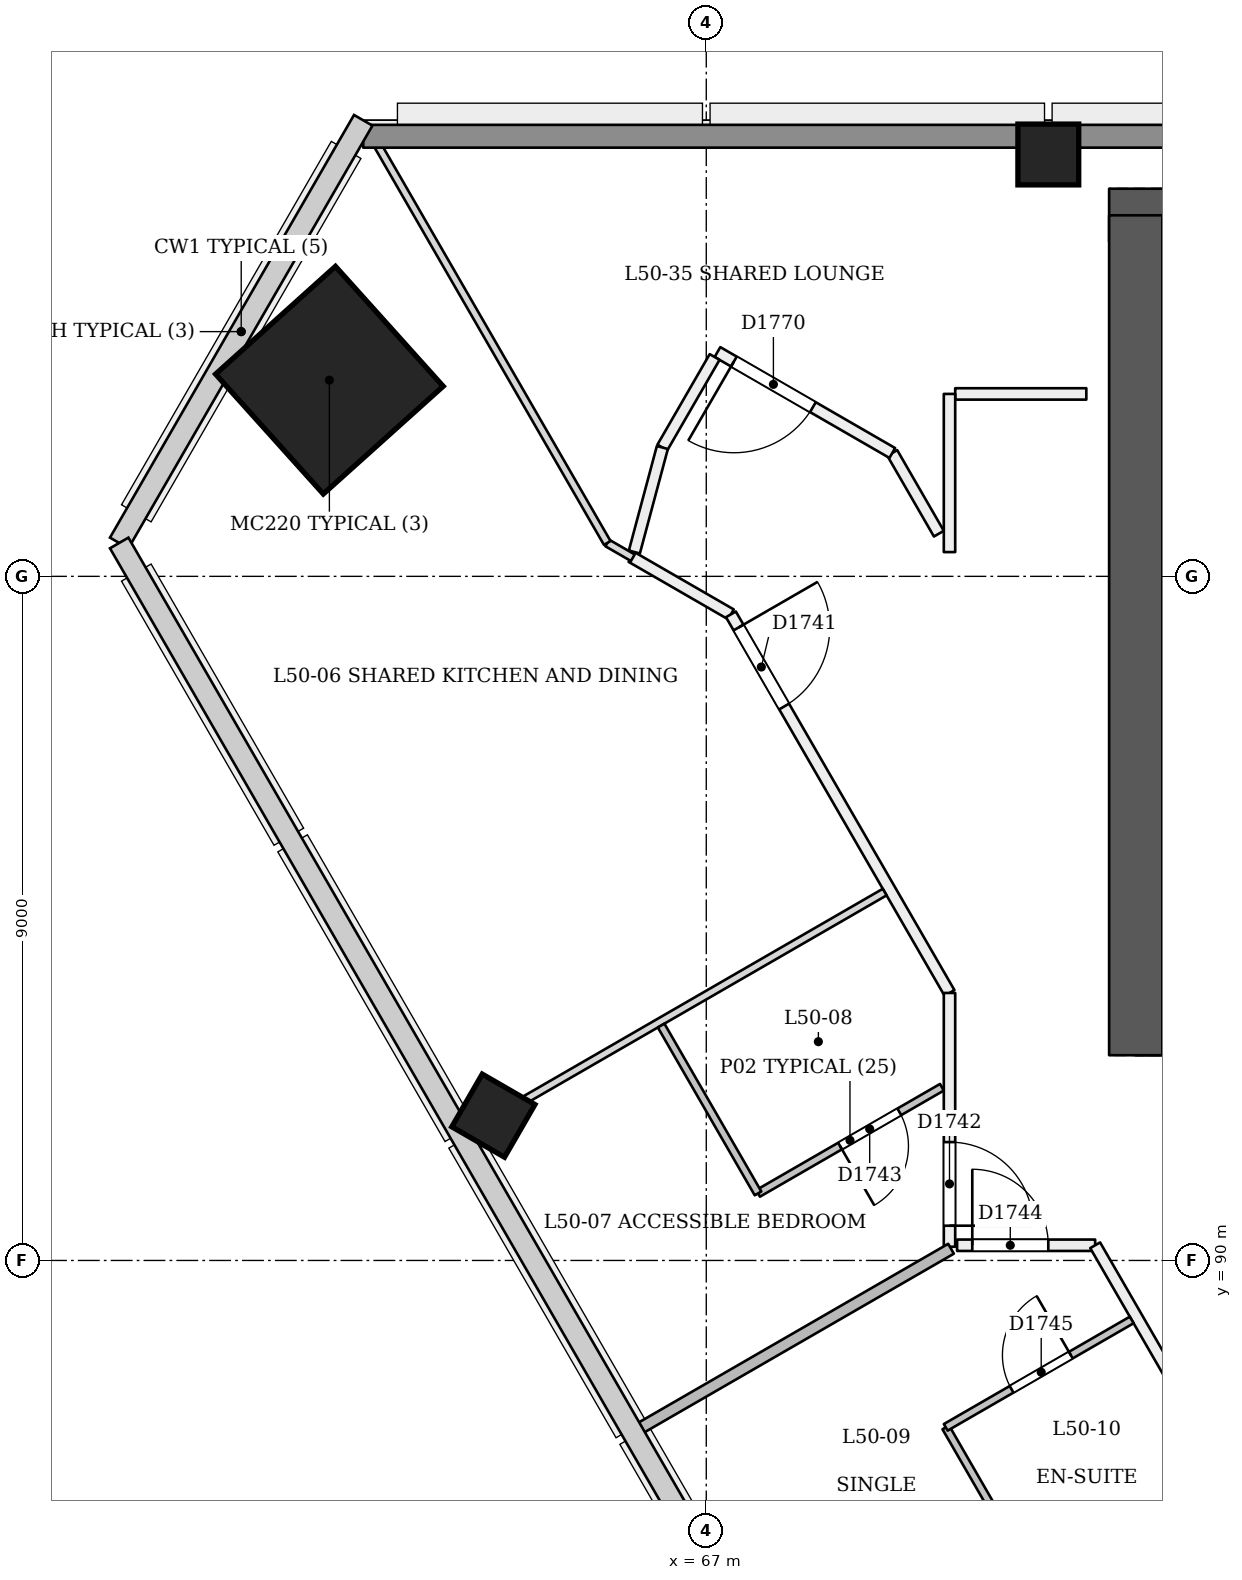
"""IFC4 building model, lengths in metres.
Left out: names, types, materials, properties, quantities, classifications, styles, units other than length and angle.
Written with IfcOpenShell. Run it as: python <this file> out.ifc"""

import sys

from ifc_helpers import new_model, si_unit, direction, frame, frame_2d, origin, origin_2d, place, context, subcontext, project, spatial, rectangle, extrude, element, fill, save


model = new_model("IFC4")
c1 = context("Model", 3, precision=1e-05, world=origin(), true_north=direction((0.0, 1.0)))
c2 = subcontext(c1, "Body", "Model", "MODEL_VIEW")
j1 = project(units=[si_unit("LENGTHUNIT", "METRE"), si_unit("PLANEANGLEUNIT", "RADIAN")], contexts=[c1])
p1 = place(None, origin())
s1 = spatial("IfcSite", under=j1, at=p1, CompositionType="ELEMENT")
p2 = place(p1, origin())
s2 = spatial("IfcBuilding", under=s1, at=p2, CompositionType="ELEMENT")
p3 = place(p2, frame((0.0, 0.0, 194.4)))
s3 = spatial("IfcBuildingStorey", under=s2, at=p3, CompositionType="ELEMENT", Elevation=194.4)
p4 = place(p3, frame((72.65, 93.05, 0.0), z_axis=(0.0, 0.0, 1.0), x_axis=(1.0, 0.0, 0.0)))
e1 = element("IfcWall", 1, at=p4, inside=s3, PredefinedType="SHEAR", context=c2, shape_type="SweptSolid", body=[
    extrude(rectangle(XDim=25.05, YDim=0.7, at=frame_2d((12.525, 0.0))), origin(), (0.0, 0.0, 1.0), 3.6),
])
p5 = place(p4, frame((1.15, 0.0, 0.0)))
e2 = element("IfcOpeningElement", 2, at=p5, cuts=e1, PredefinedType="OPENING", context=c2, shape_type="SweptSolid", body=[
    extrude(rectangle(XDim=1.2, YDim=2.1, at=frame_2d((0.6, 1.05))), frame((0.0, 0.36, 0.0), z_axis=(0.0, -1.0, 0.0), x_axis=(1.0, 0.0, 0.0)), (0.0, 0.0, 1.0), 0.721),
])
p6 = place(p4, frame((3.35, 0.0, 0.0)))
e3 = element("IfcOpeningElement", 3, at=p6, cuts=e1, PredefinedType="OPENING", context=c2, shape_type="SweptSolid", body=[
    extrude(rectangle(XDim=1.2, YDim=2.1, at=frame_2d((0.6, 1.05))), frame((0.0, 0.36, 0.0), z_axis=(0.0, -1.0, 0.0), x_axis=(1.0, 0.0, 0.0)), (0.0, 0.0, 1.0), 0.721),
])
p7 = place(p4, frame((13.35, 0.0, 0.0)))
e4 = element("IfcOpeningElement", 4, at=p7, cuts=e1, PredefinedType="OPENING", context=c2, shape_type="SweptSolid", body=[
    extrude(rectangle(XDim=1.2, YDim=2.1, at=frame_2d((0.6, 1.05))), frame((0.0, 0.36, 0.0), z_axis=(0.0, -1.0, 0.0), x_axis=(1.0, 0.0, 0.0)), (0.0, 0.0, 1.0), 0.721),
])
p8 = place(p4, frame((16.212, 0.0, 0.0)))
e5 = element("IfcOpeningElement", 5, at=p8, cuts=e1, PredefinedType="OPENING", context=c2, shape_type="SweptSolid", body=[
    extrude(rectangle(XDim=1.0, YDim=2.1, at=frame_2d((0.5, 1.05))), frame((0.0, 0.36, 0.0), z_axis=(0.0, -1.0, 0.0), x_axis=(1.0, 0.0, 0.0)), (0.0, 0.0, 1.0), 0.721),
])
p9 = place(p4, frame((19.65, 0.0, 0.0)))
e6 = element("IfcOpeningElement", 6, at=p9, cuts=e1, PredefinedType="OPENING", context=c2, shape_type="SweptSolid", body=[
    extrude(rectangle(XDim=1.0, YDim=2.1, at=frame_2d((0.5, 1.05))), frame((0.0, 0.36, 0.0), z_axis=(0.0, -1.0, 0.0), x_axis=(1.0, 0.0, 0.0)), (0.0, 0.0, 1.0), 0.721),
])
p10 = place(p4, frame((22.637, 0.0, 0.0)))
e7 = element("IfcOpeningElement", 7, at=p10, cuts=e1, PredefinedType="OPENING", context=c2, shape_type="SweptSolid", body=[
    extrude(rectangle(XDim=1.0, YDim=2.1, at=frame_2d((0.5, 1.05))), frame((0.0, 0.36, 0.0), z_axis=(0.0, -1.0, 0.0), x_axis=(1.0, 0.0, 0.0)), (0.0, 0.0, 1.0), 0.721),
])
p11 = place(p3, frame((97.35, 103.75, 0.0), z_axis=(0.0, 0.0, 1.0), x_axis=(-1.0, 0.0, 0.0)))
e8 = element("IfcWall", 8, at=p11, inside=s3, PredefinedType="SHEAR", context=c2, shape_type="SweptSolid", body=[
    extrude(rectangle(XDim=25.05, YDim=0.7, at=frame_2d((12.525, 0.0))), origin(), (0.0, 0.0, 1.0), 3.6),
])
p12 = place(p3, frame((72.65, 103.75, 0.0), z_axis=(0.0, 0.0, 1.0), x_axis=(0.0, -1.0, 0.0)))
e9 = element("IfcWall", 9, at=p12, inside=s3, PredefinedType="SHEAR", context=c2, shape_type="SweptSolid", body=[
    extrude(rectangle(XDim=11.05, YDim=0.7, at=frame_2d((5.525, 0.0))), origin(), (0.0, 0.0, 1.0), 3.6),
])
p13 = place(p3, frame((62.008, 101.57, 0.0), z_axis=(0.028334066552, 0.009286524205, 0.999555371723), x_axis=(-0.866557155579, 0.49867971023, 0.019930948781)))
e10 = element("IfcColumn", 10, at=p13, inside=s3, PredefinedType="COLUMN", context=c2, shape_type="SweptSolid", body=[
    extrude(rectangle(XDim=2.12, YDim=2.12, at=origin_2d()), origin(), (0.0, 0.0, 1.0), 3.602),
])
p14 = place(p3, frame((71.5, 104.55, 0.0), z_axis=(0.0, 0.0, 1.0), x_axis=(1.0, 0.0, 0.0)))
e11 = element("IfcColumn", 11, at=p14, inside=s3, PredefinedType="COLUMN", context=c2, shape_type="SweptSolid", body=[
    extrude(rectangle(XDim=0.8, YDim=0.8, at=origin_2d()), origin(), (0.0, 0.0, 1.0), 3.6),
])
p15 = place(p3, frame((64.173, 91.859, 0.0), z_axis=(0.022235136645, 0.038468150514, 0.999012412383), x_axis=(-0.865845034967, -0.498830353482, 0.038479265431)))
e12 = element("IfcColumn", 12, at=p15, inside=s3, PredefinedType="COLUMN", context=c2, shape_type="SweptSolid", body=[
    extrude(rectangle(XDim=0.8, YDim=0.8, at=origin_2d()), origin(), (0.0, 0.0, 1.0), 3.579),
])
p16 = place(p3, frame((66.016, 99.255, 0.0), z_axis=(0.0, 0.0, 1.0), x_axis=(0.866026809777, -0.499997564742, 0.0)))
e13 = element("IfcWall", 13, at=p16, inside=s3, PredefinedType="PARTITIONING", context=c2, shape_type="SweptSolid", body=[
    extrude(rectangle(XDim=1.511, YDim=0.15, at=frame_2d((0.755, 0.0))), origin(), (0.0, 0.0, 1.0), 3.15),
])
p17 = place(p3, frame((67.324, 98.5, 0.0), z_axis=(0.0, 0.0, 1.0), x_axis=(0.499996810272, -0.866027245367, 0.0)))
e14 = element("IfcWall", 14, at=p17, inside=s3, PredefinedType="PARTITIONING", context=c2, shape_type="SweptSolid", body=[
    extrude(rectangle(XDim=5.751, YDim=0.15, at=frame_2d((2.876, 0.0))), origin(), (0.0, 0.0, 1.0), 3.15),
])
p18 = place(p17, frame((0.2, 0.0, 0.0)))
e15 = element("IfcOpeningElement", 15, at=p18, cuts=e14, PredefinedType="OPENING", context=c2, shape_type="SweptSolid", body=[
    extrude(rectangle(XDim=1.2, YDim=2.1, at=frame_2d((0.6, 1.05))), frame((0.0, 0.085, 0.0), z_axis=(0.0, -1.0, 0.0), x_axis=(1.0, 0.0, 0.0)), (0.0, 0.0, 1.0), 0.171),
])
p19 = place(p3, frame((70.2, 93.519, 0.0), z_axis=(0.0, 0.0, 1.0), x_axis=(0.0, -1.0, 0.0)))
e16 = element("IfcWall", 16, at=p19, inside=s3, PredefinedType="PARTITIONING", context=c2, shape_type="SweptSolid", body=[
    extrude(rectangle(XDim=3.339, YDim=0.15, at=frame_2d((1.669, 0.0))), origin(), (0.0, 0.0, 1.0), 3.15),
])
p20 = place(p19, frame((1.962, 0.0, 0.0)))
e17 = element("IfcOpeningElement", 17, at=p20, cuts=e16, PredefinedType="OPENING", context=c2, shape_type="SweptSolid", body=[
    extrude(rectangle(XDim=1.1, YDim=2.1, at=frame_2d((0.55, 1.05))), frame((0.0, 0.085, 0.0), z_axis=(0.0, -1.0, 0.0), x_axis=(1.0, 0.0, 0.0)), (0.0, 0.0, 1.0), 0.171),
])
p21 = place(p3, frame((70.3, 90.2, 0.0), z_axis=(0.0, 0.0, 1.0), x_axis=(1.0, 0.0, 0.0)))
e18 = element("IfcWall", 18, at=p21, inside=s3, PredefinedType="PARTITIONING", context=c2, shape_type="SweptSolid", body=[
    extrude(rectangle(XDim=1.817, YDim=0.15, at=frame_2d((0.908, 0.0))), origin(), (0.0, 0.0, 1.0), 3.15),
])
p22 = place(p21, frame((0.2, 0.0, 0.0)))
e19 = element("IfcOpeningElement", 19, at=p22, cuts=e18, PredefinedType="OPENING", context=c2, shape_type="SweptSolid", body=[
    extrude(rectangle(XDim=1.0, YDim=2.1, at=frame_2d((0.5, 1.05))), frame((0.0, 0.085, 0.0), z_axis=(0.0, -1.0, 0.0), x_axis=(1.0, 0.0, 0.0)), (0.0, 0.0, 1.0), 0.171),
])
p23 = place(p3, frame((72.116, 90.2, 0.0), z_axis=(0.0, 0.0, 1.0), x_axis=(0.500004369671, -0.866022880939, 0.0)))
e20 = element("IfcWall", 20, at=p23, inside=s3, PredefinedType="PARTITIONING", context=c2, shape_type="SweptSolid", body=[
    extrude(rectangle(XDim=25.637, YDim=0.15, at=frame_2d((12.819, 0.0))), origin(), (0.0, 0.0, 1.0), 2.75),
])
p24 = place(p23, frame((6.487, 0.0, 0.0)))
e21 = element("IfcOpeningElement", 21, at=p24, cuts=e20, PredefinedType="OPENING", context=c2, shape_type="SweptSolid", body=[
    extrude(rectangle(XDim=1.0, YDim=2.1, at=frame_2d((0.5, 1.05))), frame((0.0, 0.085, 0.0), z_axis=(0.0, -1.0, 0.0), x_axis=(1.0, 0.0, 0.0)), (0.0, 0.0, 1.0), 0.171),
])
p25 = place(p23, frame((10.992, 0.0, 0.0)))
e22 = element("IfcOpeningElement", 22, at=p25, cuts=e20, PredefinedType="OPENING", context=c2, shape_type="SweptSolid", body=[
    extrude(rectangle(XDim=1.2, YDim=2.1, at=frame_2d((0.6, 1.05))), frame((0.0, 0.085, 0.0), z_axis=(0.0, -1.0, 0.0), x_axis=(1.0, 0.0, 0.0)), (0.0, 0.0, 1.0), 0.171),
])
p26 = place(p23, frame((19.987, 0.0, 0.0)))
e23 = element("IfcOpeningElement", 23, at=p26, cuts=e20, PredefinedType="OPENING", context=c2, shape_type="SweptSolid", body=[
    extrude(rectangle(XDim=1.0, YDim=2.1, at=frame_2d((0.5, 1.05))), frame((0.0, 0.085, 0.0), z_axis=(0.0, -1.0, 0.0), x_axis=(1.0, 0.0, 0.0)), (0.0, 0.0, 1.0), 0.171),
])
p27 = place(p23, frame((23.97, 0.0, 0.0)))
e24 = element("IfcOpeningElement", 24, at=p27, cuts=e20, PredefinedType="OPENING", context=c2, shape_type="SweptSolid", body=[
    extrude(rectangle(XDim=1.2, YDim=2.1, at=frame_2d((0.6, 1.05))), frame((0.0, 0.085, 0.0), z_axis=(0.0, -1.0, 0.0), x_axis=(1.0, 0.0, 0.0)), (0.0, 0.0, 1.0), 0.171),
])
p28 = place(p3, frame((72.0, 101.4, 0.0), z_axis=(0.0, 0.0, 1.0), x_axis=(-1.0, 0.0, 0.0)))
e25 = element("IfcWall", 25, at=p28, inside=s3, PredefinedType="PARTITIONING", context=c2, shape_type="SweptSolid", body=[
    extrude(rectangle(XDim=1.725, YDim=0.15, at=frame_2d((0.863, 0.0))), origin(), (0.0, 0.0, 1.0), 3.15),
])
p29 = place(p3, frame((70.2, 101.4, 0.0), z_axis=(0.0, 0.0, 1.0), x_axis=(0.0, -1.0, 0.0)))
e26 = element("IfcWall", 26, at=p29, inside=s3, PredefinedType="PARTITIONING", context=c2, shape_type="SweptSolid", body=[
    extrude(rectangle(XDim=2.081, YDim=0.15, at=frame_2d((1.041, 0.0))), origin(), (0.0, 0.0, 1.0), 3.15),
])
p30 = place(p3, frame((70.06, 99.562, 0.0), z_axis=(0.0, 0.0, 1.0), x_axis=(-0.499952348839, 0.866052913447, 0.0)))
e27 = element("IfcWall", 27, at=p30, inside=s3, PredefinedType="PARTITIONING", context=c2, shape_type="SweptSolid", body=[
    extrude(rectangle(XDim=1.226, YDim=0.15, at=frame_2d((0.613, 0.0))), origin(), (0.0, 0.0, 1.0), 3.15),
])
p31 = place(p3, frame((69.447, 100.623, 0.0), z_axis=(0.0, 0.0, 1.0), x_axis=(-0.866034036823, 0.49998504684, 0.0)))
e28 = element("IfcWall", 28, at=p31, inside=s3, PredefinedType="PARTITIONING", context=c2, shape_type="SweptSolid", body=[
    extrude(rectangle(XDim=2.656, YDim=0.15, at=frame_2d((1.328, 0.0))), origin(), (0.0, 0.0, 1.0), 3.15),
])
p32 = place(p31, frame((1.206, 0.0, 0.0)))
e29 = element("IfcOpeningElement", 29, at=p32, cuts=e28, PredefinedType="OPENING", context=c2, shape_type="SweptSolid", body=[
    extrude(rectangle(XDim=1.2, YDim=2.1, at=frame_2d((0.6, 1.05))), frame((0.0, 0.085, 0.0), z_axis=(0.0, -1.0, 0.0), x_axis=(1.0, 0.0, 0.0)), (0.0, 0.0, 1.0), 0.171),
])
p33 = place(p3, frame((67.11, 101.886, 0.0), z_axis=(0.0, 0.0, 1.0), x_axis=(-0.499958106649, -0.866049589571, 0.0)))
e30 = element("IfcWall", 30, at=p33, inside=s3, PredefinedType="PARTITIONING", context=c2, shape_type="SweptSolid", body=[
    extrude(rectangle(XDim=1.375, YDim=0.15, at=frame_2d((0.688, 0.0))), origin(), (0.0, 0.0, 1.0), 3.15),
])
p34 = place(p3, frame((66.422, 100.695, 0.0), z_axis=(0.0, 0.0, 1.0), x_axis=(-0.258847548609, -0.965918188347, 0.0)))
e31 = element("IfcWall", 31, at=p34, inside=s3, PredefinedType="PARTITIONING", context=c2, shape_type="SweptSolid", body=[
    extrude(rectangle(XDim=1.423, YDim=0.15, at=frame_2d((0.712, 0.0))), origin(), (0.0, 0.0, 1.0), 3.15),
])
p35 = place(p3, frame((63.87, 91.684, 0.0), z_axis=(0.0, 0.0, 1.0), x_axis=(0.866032601554, 0.49998753289, 0.0)))
e32 = element("IfcWall", 32, at=p35, inside=s3, PredefinedType="PARTITIONING", context=c2, shape_type="SweptSolid", body=[
    extrude(rectangle(XDim=6.325, YDim=0.1, at=frame_2d((3.163, 0.0))), origin(), (0.0, 0.0, 1.0), 2.65),
])
p36 = place(p3, frame((66.034, 99.245, 0.0), z_axis=(0.0, 0.0, 1.0), x_axis=(-0.86591346013, 0.500193841991, 0.0)))
e33 = element("IfcWall", 33, at=p36, inside=s3, PredefinedType="PARTITIONING", context=c2, shape_type="SweptSolid", body=[
    extrude(rectangle(XDim=0.388, YDim=0.1, at=frame_2d((0.194, 0.0))), origin(), (0.0, 0.0, 1.0), 3.15),
])
p37 = place(p3, frame((65.697, 99.439, 0.0), z_axis=(0.0, 0.0, 1.0), x_axis=(-0.499999531847, 0.866025674072, 0.0)))
e34 = element("IfcWall", 34, at=p37, inside=s3, PredefinedType="PARTITIONING", context=c2, shape_type="SweptSolid", body=[
    extrude(rectangle(XDim=6.305, YDim=0.1, at=frame_2d((3.153, 0.0))), origin(), (0.0, 0.0, 1.0), 2.65),
])
p38 = place(p3, frame((70.1, 92.279, 0.0), z_axis=(0.0, 0.0, 1.0), x_axis=(-0.866040030748, -0.499974664501, 0.0)))
e35 = element("IfcWall", 35, at=p38, inside=s3, PredefinedType="PARTITIONING", context=c2, shape_type="SweptSolid", body=[
    extrude(rectangle(XDim=2.793, YDim=0.1, at=frame_2d((1.396, 0.0))), origin(), (0.0, 0.0, 1.0), 3.15),
])
p39 = place(p38, frame((0.647, 0.0, 0.0)))
e36 = element("IfcOpeningElement", 36, at=p39, cuts=e35, PredefinedType="OPENING", context=c2, shape_type="SweptSolid", body=[
    extrude(rectangle(XDim=0.9, YDim=2.1, at=frame_2d((0.45, 1.05))), frame((0.0, 0.061, 0.0), z_axis=(0.0, -1.0, 0.0), x_axis=(1.0, 0.0, 0.0)), (0.0, 0.0, 1.0), 0.121),
])
p40 = place(p3, frame((67.681, 90.882, 0.0), z_axis=(0.0, 0.0, 1.0), x_axis=(-0.500062241894, 0.865989465428, 0.0)))
e37 = element("IfcWall", 37, at=p40, inside=s3, PredefinedType="PARTITIONING", context=c2, shape_type="SweptSolid", body=[
    extrude(rectangle(XDim=2.55, YDim=0.1, at=frame_2d((1.275, 0.0))), origin(), (0.0, 0.0, 1.0), 3.15),
])
p41 = place(p3, frame((66.102, 87.777, 0.0), z_axis=(0.0, 0.0, 1.0), x_axis=(0.866029116435, 0.499993569446, 0.0)))
e38 = element("IfcWall", 38, at=p41, inside=s3, PredefinedType="PARTITIONING", context=c2, shape_type="SweptSolid", body=[
    extrude(rectangle(XDim=4.755, YDim=0.15, at=frame_2d((2.377, 0.0))), origin(), (0.0, 0.0, 1.0), 2.65),
])
p42 = place(p3, frame((71.251, 85.899, 0.0), z_axis=(0.0, 0.0, 1.0), x_axis=(-0.50002983664, 0.866008176907, 0.0)))
e39 = element("IfcWall", 39, at=p42, inside=s3, PredefinedType="PARTITIONING", context=c2, shape_type="SweptSolid", body=[
    extrude(rectangle(XDim=2.2, YDim=0.1, at=frame_2d((1.1, 0.0))), origin(), (0.0, 0.0, 1.0), 3.15),
])
p43 = place(p3, frame((70.151, 87.805, 0.0), z_axis=(0.0, 0.0, 1.0), x_axis=(0.866048868473, 0.499959355765, 0.0)))
e40 = element("IfcWall", 40, at=p43, inside=s3, PredefinedType="PARTITIONING", context=c2, shape_type="SweptSolid", body=[
    extrude(rectangle(XDim=2.825, YDim=0.1, at=frame_2d((1.413, 0.0))), origin(), (0.0, 0.0, 1.0), 3.15),
])
p44 = place(p43, frame((1.0, 0.0, 0.0)))
e41 = element("IfcOpeningElement", 41, at=p44, cuts=e40, PredefinedType="OPENING", context=c2, shape_type="SweptSolid", body=[
    extrude(rectangle(XDim=0.9, YDim=2.1, at=frame_2d((0.45, 1.05))), frame((0.0, 0.061, 0.0), z_axis=(0.0, -1.0, 0.0), x_axis=(1.0, 0.0, 0.0)), (0.0, 0.0, 1.0), 0.121),
])
p45 = place(p3, frame((71.383, 85.629, 0.0), z_axis=(0.0, 0.0, 1.0), x_axis=(0.866011243319, 0.500024525844, 0.0)))
e42 = element("IfcWall", 42, at=p45, inside=s3, PredefinedType="PARTITIONING", context=c2, shape_type="SweptSolid", body=[
    extrude(rectangle(XDim=2.845, YDim=0.1, at=frame_2d((1.422, 0.0))), origin(), (0.0, 0.0, 1.0), 2.75),
])
p46 = place(p3, frame((62.487, 104.79, 0.0), z_axis=(0.0, 0.0, 1.0), x_axis=(1.0, 0.0, 0.0)))
e43 = element("IfcWall", 43, at=p46, inside=s3, PredefinedType="SOLIDWALL", context=c2, shape_type="SweptSolid", body=[
    extrude(rectangle(XDim=45.026, YDim=0.3, at=frame_2d((22.513, 0.0))), origin(), (0.0, 0.0, 1.0), 2.65),
])
p47 = place(p18, origin())
e44 = element("IfcDoor", 44, at=p47, inside=s3, OperationType="SINGLE_SWING_LEFT", PredefinedType="NOTDEFINED", context=c2, shape_type="SweptSolid", body=[
    extrude(rectangle(XDim=1.2, YDim=2.1, at=frame_2d((0.6, 1.05))), frame((0.0, 0.025, 0.0), z_axis=(0.0, -1.0, 0.0), x_axis=(1.0, 0.0, 0.0)), (0.0, 0.0, 1.0), 0.05),
])
fill(e15, e44)
p48 = place(p20, origin())
e45 = element("IfcDoor", 45, at=p48, inside=s3, OperationType="SINGLE_SWING_RIGHT", PredefinedType="NOTDEFINED", context=c2, shape_type="SweptSolid", body=[
    extrude(rectangle(XDim=1.1, YDim=2.1, at=frame_2d((0.55, 1.05))), frame((0.0, 0.025, 0.0), z_axis=(0.0, -1.0, 0.0), x_axis=(1.0, 0.0, 0.0)), (0.0, 0.0, 1.0), 0.05),
])
fill(e17, e45)
p49 = place(p39, origin())
e46 = element("IfcDoor", 46, at=p49, inside=s3, OperationType="SINGLE_SWING_RIGHT", PredefinedType="NOTDEFINED", context=c2, shape_type="SweptSolid", body=[
    extrude(rectangle(XDim=0.9, YDim=2.1, at=frame_2d((0.45, 1.05))), frame((0.0, 0.025, 0.0), z_axis=(0.0, -1.0, 0.0), x_axis=(1.0, 0.0, 0.0)), (0.0, 0.0, 1.0), 0.05),
])
fill(e36, e46)
p50 = place(p22, origin())
e47 = element("IfcDoor", 47, at=p50, inside=s3, OperationType="SINGLE_SWING_LEFT", PredefinedType="NOTDEFINED", context=c2, shape_type="SweptSolid", body=[
    extrude(rectangle(XDim=1.0, YDim=2.1, at=frame_2d((0.5, 1.05))), frame((0.0, 0.025, 0.0), z_axis=(0.0, -1.0, 0.0), x_axis=(1.0, 0.0, 0.0)), (0.0, 0.0, 1.0), 0.05),
])
fill(e19, e47)
p51 = place(p44, origin())
e48 = element("IfcDoor", 48, at=p51, inside=s3, OperationType="SINGLE_SWING_RIGHT", PredefinedType="NOTDEFINED", context=c2, shape_type="SweptSolid", body=[
    extrude(rectangle(XDim=0.9, YDim=2.1, at=frame_2d((0.45, 1.05))), frame((0.0, 0.025, 0.0), z_axis=(0.0, -1.0, 0.0), x_axis=(1.0, 0.0, 0.0)), (0.0, 0.0, 1.0), 0.05),
])
fill(e41, e48)
p52 = place(p32, origin())
e49 = element("IfcDoor", 49, at=p52, inside=s3, OperationType="SINGLE_SWING_RIGHT", PredefinedType="NOTDEFINED", context=c2, shape_type="SweptSolid", body=[
    extrude(rectangle(XDim=1.2, YDim=2.1, at=frame_2d((0.6, 1.05))), frame((0.0, 0.025, 0.0), z_axis=(0.0, -1.0, 0.0), x_axis=(1.0, 0.0, 0.0)), (0.0, 0.0, 1.0), 0.05),
])
fill(e29, e49)
save(model, sys.argv[1])
